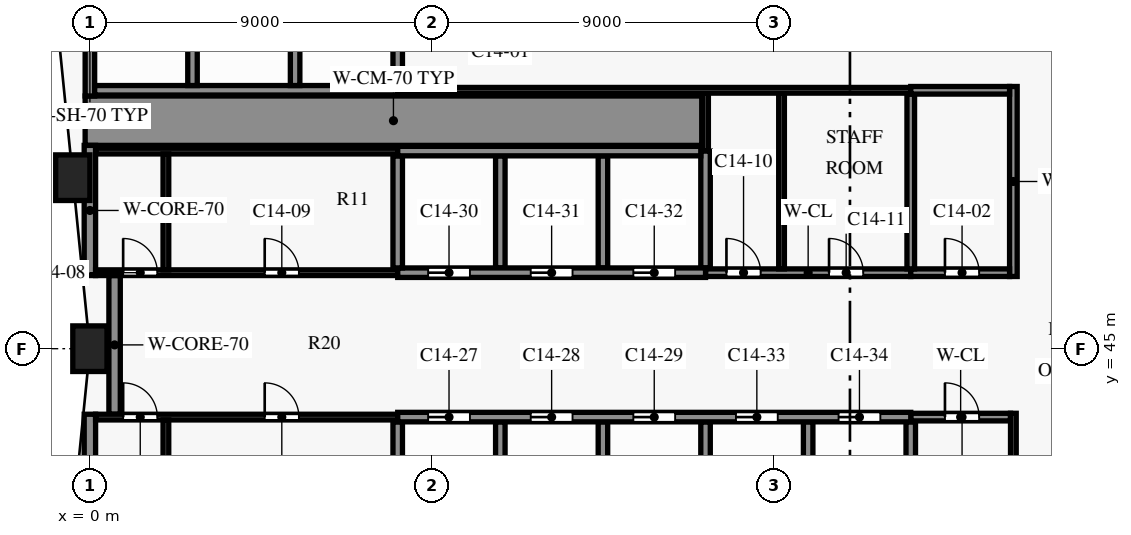
"""IFC4 building model, lengths in metres.
Left out: names, types, materials, properties, quantities, classifications, styles, units other than length and angle.
Written with IfcOpenShell. Run it as: python <this file> out.ifc"""

import sys

from ifc_helpers import new_model, si_unit, direction, frame, frame_2d, origin, origin_2d, place, context, subcontext, project, spatial, rectangle, extrude, element, fill, save


model = new_model("IFC4")
c1 = context("Model", 3, precision=1e-05, world=origin(), true_north=direction((0.0, 1.0)))
c2 = subcontext(c1, "Body", "Model", "MODEL_VIEW")
j1 = project(units=[si_unit("LENGTHUNIT", "METRE"), si_unit("PLANEANGLEUNIT", "RADIAN")], contexts=[c1])
p1 = place(None, origin())
s1 = spatial("IfcSite", under=j1, at=p1, CompositionType="ELEMENT")
p2 = place(p1, origin())
s2 = spatial("IfcBuilding", under=s1, at=p2, CompositionType="ELEMENT")
p3 = place(p2, frame((0.0, 0.0, 96.1)))
s3 = spatial("IfcBuildingStorey", under=s2, at=p3, CompositionType="ELEMENT", Elevation=96.1)
for number, where, z_axis, x_axis in (
    (1, (-0.45, 49.5, 0.0), (0.0, 0.0, 1.0), (0.1, -0.995, 0.0)),
    (2, (0.0, 45.0, 0.0), (0.0, 0.0, 1.0), (0.0, -1.0, 0.0)),
):
    element("IfcColumn", number, at=place(p3, frame(where, z_axis=z_axis, x_axis=x_axis)), inside=s3, PredefinedType="COLUMN", context=c2, shape_type="SweptSolid", body=[
        extrude(rectangle(XDim=0.9, YDim=1.2, at=origin_2d()), origin(), (0.0, 0.0, 1.0), 3.8),
    ])
p4 = place(p3, frame((21.6, 43.2, 0.0), z_axis=(0.0, 0.0, 1.0), x_axis=(1.0, 0.0, 0.0)))
e3 = element("IfcWall", 3, at=p4, inside=s3, PredefinedType="PARTITIONING", context=c2, shape_type="SweptSolid", body=[
    extrude(rectangle(XDim=2.625, YDim=0.2, at=frame_2d((1.312, 0.0))), origin(), (0.0, 0.0, 1.0), 3.5),
])
p5 = place(p4, frame((0.9, 0.0, 0.0)))
e4 = element("IfcOpeningElement", 4, at=p5, cuts=e3, PredefinedType="OPENING", context=c2, shape_type="SweptSolid", body=[
    extrude(rectangle(XDim=0.9, YDim=2.1, at=frame_2d((0.45, 1.05))), frame((0.0, 0.11, 0.0), z_axis=(0.0, -1.0, 0.0), x_axis=(1.0, 0.0, 0.0)), (0.0, 0.0, 1.0), 0.22),
])
p6 = place(p3, frame((0.15, 43.2, 0.0), z_axis=(0.0, 0.0, 1.0), x_axis=(1.0, 0.0, 0.0)))
e5 = element("IfcWall", 5, at=p6, inside=s3, PredefinedType="PARTITIONING", context=c2, shape_type="SweptSolid", body=[
    extrude(rectangle(XDim=7.95, YDim=0.15, at=frame_2d((3.975, 0.0))), origin(), (0.0, 0.0, 1.0), 3.5),
])
p7 = place(p6, frame((0.725, 0.0, 0.0)))
e6 = element("IfcOpeningElement", 6, at=p7, cuts=e5, PredefinedType="OPENING", context=c2, shape_type="SweptSolid", body=[
    extrude(rectangle(XDim=0.9, YDim=2.1, at=frame_2d((0.45, 1.05))), frame((0.0, 0.085, 0.0), z_axis=(0.0, -1.0, 0.0), x_axis=(1.0, 0.0, 0.0)), (0.0, 0.0, 1.0), 0.17),
])
p8 = place(p6, frame((4.45, 0.0, 0.0)))
e7 = element("IfcOpeningElement", 7, at=p8, cuts=e5, PredefinedType="OPENING", context=c2, shape_type="SweptSolid", body=[
    extrude(rectangle(XDim=0.9, YDim=2.1, at=frame_2d((0.45, 1.05))), frame((0.0, 0.085, 0.0), z_axis=(0.0, -1.0, 0.0), x_axis=(1.0, 0.0, 0.0)), (0.0, 0.0, 1.0), 0.17),
])
p9 = place(p3, frame((8.1, 43.2, 0.0), z_axis=(0.0, 0.0, 1.0), x_axis=(1.0, 0.0, 0.0)))
e8 = element("IfcWall", 8, at=p9, inside=s3, PredefinedType="SHEAR", context=c2, shape_type="SweptSolid", body=[
    extrude(rectangle(XDim=13.5, YDim=0.25, at=frame_2d((6.75, 0.0))), origin(), (0.0, 0.0, 1.0), 3.5),
])
p10 = place(p9, frame((0.8, 0.0, 0.0)))
e9 = element("IfcOpeningElement", 9, at=p10, cuts=e8, PredefinedType="OPENING", context=c2, shape_type="SweptSolid", body=[
    extrude(rectangle(XDim=1.1, YDim=2.1, at=frame_2d((0.55, 1.05))), frame((0.0, 0.135, 0.0), z_axis=(0.0, -1.0, 0.0), x_axis=(1.0, 0.0, 0.0)), (0.0, 0.0, 1.0), 0.27),
])
p11 = place(p9, frame((3.5, 0.0, 0.0)))
e10 = element("IfcOpeningElement", 10, at=p11, cuts=e8, PredefinedType="OPENING", context=c2, shape_type="SweptSolid", body=[
    extrude(rectangle(XDim=1.1, YDim=2.1, at=frame_2d((0.55, 1.05))), frame((0.0, 0.135, 0.0), z_axis=(0.0, -1.0, 0.0), x_axis=(1.0, 0.0, 0.0)), (0.0, 0.0, 1.0), 0.27),
])
p12 = place(p9, frame((6.2, 0.0, 0.0)))
e11 = element("IfcOpeningElement", 11, at=p12, cuts=e8, PredefinedType="OPENING", context=c2, shape_type="SweptSolid", body=[
    extrude(rectangle(XDim=1.1, YDim=2.1, at=frame_2d((0.55, 1.05))), frame((0.0, 0.135, 0.0), z_axis=(0.0, -1.0, 0.0), x_axis=(1.0, 0.0, 0.0)), (0.0, 0.0, 1.0), 0.27),
])
p13 = place(p9, frame((8.9, 0.0, 0.0)))
e12 = element("IfcOpeningElement", 12, at=p13, cuts=e8, PredefinedType="OPENING", context=c2, shape_type="SweptSolid", body=[
    extrude(rectangle(XDim=1.1, YDim=2.1, at=frame_2d((0.55, 1.05))), frame((0.0, 0.135, 0.0), z_axis=(0.0, -1.0, 0.0), x_axis=(1.0, 0.0, 0.0)), (0.0, 0.0, 1.0), 0.27),
])
p14 = place(p9, frame((11.6, 0.0, 0.0)))
e13 = element("IfcOpeningElement", 13, at=p14, cuts=e8, PredefinedType="OPENING", context=c2, shape_type="SweptSolid", body=[
    extrude(rectangle(XDim=1.1, YDim=2.1, at=frame_2d((0.55, 1.05))), frame((0.0, 0.135, 0.0), z_axis=(0.0, -1.0, 0.0), x_axis=(1.0, 0.0, 0.0)), (0.0, 0.0, 1.0), 0.27),
])
p15 = place(p3, frame((16.2, 47.0, 0.0), z_axis=(0.0, 0.0, 1.0), x_axis=(1.0, 0.0, 0.0)))
e14 = element("IfcWall", 14, at=p15, inside=s3, PredefinedType="PARTITIONING", context=c2, shape_type="SweptSolid", body=[
    extrude(rectangle(XDim=5.4, YDim=0.2, at=frame_2d((2.7, 0.0))), origin(), (0.0, 0.0, 1.0), 3.5),
])
p16 = place(p15, frame((0.55, 0.0, 0.0)))
e15 = element("IfcOpeningElement", 15, at=p16, cuts=e14, PredefinedType="OPENING", context=c2, shape_type="SweptSolid", body=[
    extrude(rectangle(XDim=0.9, YDim=2.1, at=frame_2d((0.45, 1.05))), frame((0.0, 0.11, 0.0), z_axis=(0.0, -1.0, 0.0), x_axis=(1.0, 0.0, 0.0)), (0.0, 0.0, 1.0), 0.22),
])
p17 = place(p15, frame((3.25, 0.0, 0.0)))
e16 = element("IfcOpeningElement", 16, at=p17, cuts=e14, PredefinedType="OPENING", context=c2, shape_type="SweptSolid", body=[
    extrude(rectangle(XDim=0.9, YDim=2.1, at=frame_2d((0.45, 1.05))), frame((0.0, 0.11, 0.0), z_axis=(0.0, -1.0, 0.0), x_axis=(1.0, 0.0, 0.0)), (0.0, 0.0, 1.0), 0.22),
])
p18 = place(p3, frame((0.15, 47.0, 0.0), z_axis=(0.0, 0.0, 1.0), x_axis=(1.0, 0.0, 0.0)))
e17 = element("IfcWall", 17, at=p18, inside=s3, PredefinedType="PARTITIONING", context=c2, shape_type="SweptSolid", body=[
    extrude(rectangle(XDim=7.95, YDim=0.15, at=frame_2d((3.975, 0.0))), origin(), (0.0, 0.0, 1.0), 3.5),
])
p19 = place(p18, frame((0.725, 0.0, 0.0)))
e18 = element("IfcOpeningElement", 18, at=p19, cuts=e17, PredefinedType="OPENING", context=c2, shape_type="SweptSolid", body=[
    extrude(rectangle(XDim=0.9, YDim=2.1, at=frame_2d((0.45, 1.05))), frame((0.0, 0.085, 0.0), z_axis=(0.0, -1.0, 0.0), x_axis=(1.0, 0.0, 0.0)), (0.0, 0.0, 1.0), 0.17),
])
p20 = place(p18, frame((4.45, 0.0, 0.0)))
e19 = element("IfcOpeningElement", 19, at=p20, cuts=e17, PredefinedType="OPENING", context=c2, shape_type="SweptSolid", body=[
    extrude(rectangle(XDim=0.9, YDim=2.1, at=frame_2d((0.45, 1.05))), frame((0.0, 0.085, 0.0), z_axis=(0.0, -1.0, 0.0), x_axis=(1.0, 0.0, 0.0)), (0.0, 0.0, 1.0), 0.17),
])
p21 = place(p3, frame((21.6, 47.0, 0.0), z_axis=(0.0, 0.0, 1.0), x_axis=(1.0, 0.0, 0.0)))
e20 = element("IfcWall", 20, at=p21, inside=s3, PredefinedType="PARTITIONING", context=c2, shape_type="SweptSolid", body=[
    extrude(rectangle(XDim=2.6, YDim=0.2, at=frame_2d((1.3, 0.0))), origin(), (0.0, 0.0, 1.0), 3.5),
])
p22 = place(p21, frame((0.9, 0.0, 0.0)))
e21 = element("IfcOpeningElement", 21, at=p22, cuts=e20, PredefinedType="OPENING", context=c2, shape_type="SweptSolid", body=[
    extrude(rectangle(XDim=0.9, YDim=2.1, at=frame_2d((0.45, 1.05))), frame((0.0, 0.11, 0.0), z_axis=(0.0, -1.0, 0.0), x_axis=(1.0, 0.0, 0.0)), (0.0, 0.0, 1.0), 0.22),
])
p23 = place(p3, frame((8.1, 47.0, 0.0), z_axis=(0.0, 0.0, 1.0), x_axis=(1.0, 0.0, 0.0)))
e22 = element("IfcWall", 22, at=p23, inside=s3, PredefinedType="SHEAR", context=c2, shape_type="SweptSolid", body=[
    extrude(rectangle(XDim=8.1, YDim=0.25, at=frame_2d((4.05, 0.0))), origin(), (0.0, 0.0, 1.0), 3.5),
])
p24 = place(p23, frame((0.8, 0.0, 0.0)))
e23 = element("IfcOpeningElement", 23, at=p24, cuts=e22, PredefinedType="OPENING", context=c2, shape_type="SweptSolid", body=[
    extrude(rectangle(XDim=1.1, YDim=2.1, at=frame_2d((0.55, 1.05))), frame((0.0, 0.135, 0.0), z_axis=(0.0, -1.0, 0.0), x_axis=(1.0, 0.0, 0.0)), (0.0, 0.0, 1.0), 0.27),
])
p25 = place(p23, frame((3.5, 0.0, 0.0)))
e24 = element("IfcOpeningElement", 24, at=p25, cuts=e22, PredefinedType="OPENING", context=c2, shape_type="SweptSolid", body=[
    extrude(rectangle(XDim=1.1, YDim=2.1, at=frame_2d((0.55, 1.05))), frame((0.0, 0.135, 0.0), z_axis=(0.0, -1.0, 0.0), x_axis=(1.0, 0.0, 0.0)), (0.0, 0.0, 1.0), 0.27),
])
p26 = place(p23, frame((6.2, 0.0, 0.0)))
e25 = element("IfcOpeningElement", 25, at=p26, cuts=e22, PredefinedType="OPENING", context=c2, shape_type="SweptSolid", body=[
    extrude(rectangle(XDim=1.1, YDim=2.1, at=frame_2d((0.55, 1.05))), frame((0.0, 0.135, 0.0), z_axis=(0.0, -1.0, 0.0), x_axis=(1.0, 0.0, 0.0)), (0.0, 0.0, 1.0), 0.27),
])
p27 = place(p3, frame((0.15, 50.2, 0.0), z_axis=(0.0, 0.0, 1.0), x_axis=(1.0, 0.0, 0.0)))
e26 = element("IfcWall", 26, at=p27, inside=s3, PredefinedType="PARTITIONING", context=c2, shape_type="SweptSolid", body=[
    extrude(rectangle(XDim=7.95, YDim=0.15, at=frame_2d((3.975, 0.0))), origin(), (0.0, 0.0, 1.0), 3.5),
])
p28 = place(p3, frame((8.1, 50.2, 0.0), z_axis=(0.0, 0.0, 1.0), x_axis=(1.0, 0.0, 0.0)))
e27 = element("IfcWall", 27, at=p28, inside=s3, PredefinedType="SHEAR", context=c2, shape_type="SweptSolid", body=[
    extrude(rectangle(XDim=7.975, YDim=0.25, at=frame_2d((3.987, 0.0))), origin(), (0.0, 0.0, 1.0), 3.5),
])
p29 = place(p3, frame((-0.125, 51.0, 0.0), z_axis=(0.0, 0.0, 1.0), x_axis=(1.0, 0.0, 0.0)))
e28 = element("IfcWall", 28, at=p29, inside=s3, PredefinedType="SHEAR", context=c2, shape_type="SweptSolid", body=[
    extrude(rectangle(XDim=16.225, YDim=1.3, at=frame_2d((8.113, 0.0))), origin(), (0.0, 0.0, 1.0), 3.5),
])
p30 = place(p3, frame((8.1, 51.8, 0.0), z_axis=(0.0, 0.0, 1.0), x_axis=(1.0, 0.0, 0.0)))
e29 = element("IfcWall", 29, at=p30, inside=s3, PredefinedType="PARTITIONING", context=c2, shape_type="SweptSolid", body=[
    extrude(rectangle(XDim=13.5, YDim=0.15, at=frame_2d((6.75, 0.0))), origin(), (0.0, 0.0, 1.0), 3.5),
])
p31 = place(p3, frame((21.6, 51.8, 0.0), z_axis=(0.0, 0.0, 1.0), x_axis=(1.0, 0.0, 0.0)))
e30 = element("IfcWall", 30, at=p31, inside=s3, PredefinedType="PARTITIONING", context=c2, shape_type="SweptSolid", body=[
    extrude(rectangle(XDim=2.6, YDim=0.2, at=frame_2d((1.3, 0.0))), origin(), (0.0, 0.0, 1.0), 3.5),
])
p32 = place(p3, frame((0.125, 51.8, 0.0), z_axis=(0.0, 0.0, 1.0), x_axis=(1.0, 0.0, 0.0)))
e31 = element("IfcWall", 31, at=p32, inside=s3, PredefinedType="SHEAR", context=c2, shape_type="SweptSolid", body=[
    extrude(rectangle(XDim=7.975, YDim=0.25, at=frame_2d((3.988, 0.0))), origin(), (0.0, 0.0, 1.0), 3.5),
])
p33 = place(p3, frame((0.0, 35.925, 0.0), z_axis=(0.0, 0.0, 1.0), x_axis=(0.0, 1.0, 0.0)))
e32 = element("IfcWall", 32, at=p33, inside=s3, PredefinedType="SHEAR", context=c2, shape_type="SweptSolid", body=[
    extrude(rectangle(XDim=7.35, YDim=0.3, at=frame_2d((3.675, 0.0))), origin(), (0.0, 0.0, 1.0), 3.5),
])
p34 = place(p3, frame((0.0, 46.925, 0.0), z_axis=(0.0, 0.0, 1.0), x_axis=(0.0, 1.0, 0.0)))
e33 = element("IfcWall", 33, at=p34, inside=s3, PredefinedType="SHEAR", context=c2, shape_type="SweptSolid", body=[
    extrude(rectangle(XDim=3.425, YDim=0.3, at=frame_2d((1.712, 0.0))), origin(), (0.0, 0.0, 1.0), 3.5),
])
p35 = place(p3, frame((0.0, 51.65, 0.0), z_axis=(0.0, 0.0, 1.0), x_axis=(0.0, 1.0, 0.0)))
e34 = element("IfcWall", 34, at=p35, inside=s3, PredefinedType="SHEAR", context=c2, shape_type="SweptSolid", body=[
    extrude(rectangle(XDim=3.35, YDim=0.25, at=frame_2d((1.675, 0.0))), origin(), (0.0, 0.0, 1.0), 3.5),
])
p36 = place(p3, frame((0.65, 43.275, 0.0), z_axis=(0.0, 0.0, 1.0), x_axis=(0.0, 1.0, 0.0)))
e35 = element("IfcWall", 35, at=p36, inside=s3, PredefinedType="SHEAR", context=c2, shape_type="SweptSolid", body=[
    extrude(rectangle(XDim=3.65, YDim=0.3, at=frame_2d((1.825, 0.0))), origin(), (0.0, 0.0, 1.0), 3.5),
])
for number, where, z_axis, x_axis in (
    (36, (2.0, 40.075, 0.0), (0.0, 0.0, 1.0), (0.0, 1.0, 0.0)),
    (37, (2.0, 47.075, 0.0), (0.0, 0.0, 1.0), (0.0, 1.0, 0.0)),
):
    element("IfcWall", number, at=place(p3, frame(where, z_axis=z_axis, x_axis=x_axis)), inside=s3, PredefinedType="PARTITIONING", context=c2, shape_type="SweptSolid", body=[
        extrude(rectangle(XDim=3.05, YDim=0.15, at=frame_2d((1.525, 0.0))), origin(), (0.0, 0.0, 1.0), 3.5),
    ])
for number, where, z_axis, x_axis in (
    (38, (2.7, 51.925, 0.0), (0.0, 0.0, 1.0), (0.0, 1.0, 0.0)),
    (39, (5.4, 51.925, 0.0), (0.0, 0.0, 1.0), (0.0, 1.0, 0.0)),
    (40, (8.1, 40.125, 0.0), (0.0, 0.0, 1.0), (0.0, 1.0, 0.0)),
    (41, (8.1, 47.125, 0.0), (0.0, 0.0, 1.0), (0.0, 1.0, 0.0)),
    (42, (8.1, 51.925, 0.0), (0.0, 0.0, 1.0), (0.0, 1.0, 0.0)),
    (43, (10.8, 40.125, 0.0), (0.0, 0.0, 1.0), (0.0, 1.0, 0.0)),
    (44, (10.8, 47.125, 0.0), (0.0, 0.0, 1.0), (0.0, 1.0, 0.0)),
    (45, (13.5, 40.125, 0.0), (0.0, 0.0, 1.0), (0.0, 1.0, 0.0)),
    (46, (13.5, 47.125, 0.0), (0.0, 0.0, 1.0), (0.0, 1.0, 0.0)),
):
    element("IfcWall", number, at=place(p3, frame(where, z_axis=z_axis, x_axis=x_axis)), inside=s3, PredefinedType="SHEAR", context=c2, shape_type="SweptSolid", body=[
        extrude(rectangle(XDim=2.95, YDim=0.25, at=frame_2d((1.475, 0.0))), origin(), (0.0, 0.0, 1.0), 3.5),
    ])
p37 = place(p3, frame((16.2, 50.2, 0.0), z_axis=(0.0, 0.0, 1.0), x_axis=(0.0, 1.0, 0.0)))
e47 = element("IfcWall", 47, at=p37, inside=s3, PredefinedType="PARTITIONING", context=c2, shape_type="SweptSolid", body=[
    extrude(rectangle(XDim=1.525, YDim=0.15, at=frame_2d((0.763, 0.0))), origin(), (0.0, 0.0, 1.0), 3.5),
])
p38 = place(p3, frame((16.2, 40.125, 0.0), z_axis=(0.0, 0.0, 1.0), x_axis=(0.0, 1.0, 0.0)))
e48 = element("IfcWall", 48, at=p38, inside=s3, PredefinedType="SHEAR", context=c2, shape_type="SweptSolid", body=[
    extrude(rectangle(XDim=2.95, YDim=0.25, at=frame_2d((1.475, 0.0))), origin(), (0.0, 0.0, 1.0), 3.5),
])
p39 = place(p3, frame((16.2, 47.125, 0.0), z_axis=(0.0, 0.0, 1.0), x_axis=(0.0, 1.0, 0.0)))
e49 = element("IfcWall", 49, at=p39, inside=s3, PredefinedType="SHEAR", context=c2, shape_type="SweptSolid", body=[
    extrude(rectangle(XDim=3.075, YDim=0.25, at=frame_2d((1.538, 0.0))), origin(), (0.0, 0.0, 1.0), 3.5),
])
p40 = place(p3, frame((18.2, 47.1, 0.0), z_axis=(0.0, 0.0, 1.0), x_axis=(0.0, 1.0, 0.0)))
e50 = element("IfcWall", 50, at=p40, inside=s3, PredefinedType="PARTITIONING", context=c2, shape_type="SweptSolid", body=[
    extrude(rectangle(XDim=4.625, YDim=0.15, at=frame_2d((2.312, 0.0))), origin(), (0.0, 0.0, 1.0), 3.5),
])
p41 = place(p3, frame((18.9, 40.125, 0.0), z_axis=(0.0, 0.0, 1.0), x_axis=(0.0, 1.0, 0.0)))
e51 = element("IfcWall", 51, at=p41, inside=s3, PredefinedType="SHEAR", context=c2, shape_type="SweptSolid", body=[
    extrude(rectangle(XDim=2.95, YDim=0.25, at=frame_2d((1.475, 0.0))), origin(), (0.0, 0.0, 1.0), 3.5),
])
p42 = place(p3, frame((21.6, 47.1, 0.0), z_axis=(0.0, 0.0, 1.0), x_axis=(0.0, 1.0, 0.0)))
e52 = element("IfcWall", 52, at=p42, inside=s3, PredefinedType="PARTITIONING", context=c2, shape_type="SweptSolid", body=[
    extrude(rectangle(XDim=4.6, YDim=0.2, at=frame_2d((2.3, 0.0))), origin(), (0.0, 0.0, 1.0), 3.5),
])
p43 = place(p3, frame((21.6, 40.125, 0.0), z_axis=(0.0, 0.0, 1.0), x_axis=(0.0, 1.0, 0.0)))
e53 = element("IfcWall", 53, at=p43, inside=s3, PredefinedType="SHEAR", context=c2, shape_type="SweptSolid", body=[
    extrude(rectangle(XDim=2.95, YDim=0.25, at=frame_2d((1.475, 0.0))), origin(), (0.0, 0.0, 1.0), 3.5),
])
p44 = place(p3, frame((24.3, 35.925, 0.0), z_axis=(0.0, 0.0, 1.0), x_axis=(0.0, 1.0, 0.0)))
e54 = element("IfcWall", 54, at=p44, inside=s3, PredefinedType="PARTITIONING", context=c2, shape_type="SweptSolid", body=[
    extrude(rectangle(XDim=7.375, YDim=0.15, at=frame_2d((3.688, 0.0))), origin(), (0.0, 0.0, 1.0), 3.5),
])
p45 = place(p3, frame((24.3, 46.9, 0.0), z_axis=(0.0, 0.0, 1.0), x_axis=(0.0, 1.0, 0.0)))
e55 = element("IfcWall", 55, at=p45, inside=s3, PredefinedType="SHEAR", context=c2, shape_type="SweptSolid", body=[
    extrude(rectangle(XDim=5.0, YDim=0.2, at=frame_2d((2.5, 0.0))), origin(), (0.0, 0.0, 1.0), 3.5),
])
p46 = place(p22, origin())
e56 = element("IfcDoor", 56, at=p46, inside=s3, OperationType="SINGLE_SWING_LEFT", PredefinedType="DOOR", context=c2, shape_type="SweptSolid", body=[
    extrude(rectangle(XDim=0.9, YDim=2.1, at=frame_2d((0.45, 1.05))), frame((0.0, 0.025, 0.0), z_axis=(0.0, -1.0, 0.0), x_axis=(1.0, 0.0, 0.0)), (0.0, 0.0, 1.0), 0.05),
])
fill(e21, e56)
p47 = place(p19, origin())
e57 = element("IfcDoor", 57, at=p47, inside=s3, OperationType="SINGLE_SWING_RIGHT", PredefinedType="DOOR", context=c2, shape_type="SweptSolid", body=[
    extrude(rectangle(XDim=0.9, YDim=2.1, at=frame_2d((0.45, 1.05))), frame((0.0, 0.025, 0.0), z_axis=(0.0, -1.0, 0.0), x_axis=(1.0, 0.0, 0.0)), (0.0, 0.0, 1.0), 0.05),
])
fill(e18, e57)
p48 = place(p20, origin())
e58 = element("IfcDoor", 58, at=p48, inside=s3, OperationType="SINGLE_SWING_LEFT", PredefinedType="DOOR", context=c2, shape_type="SweptSolid", body=[
    extrude(rectangle(XDim=0.9, YDim=2.1, at=frame_2d((0.45, 1.05))), frame((0.0, 0.025, 0.0), z_axis=(0.0, -1.0, 0.0), x_axis=(1.0, 0.0, 0.0)), (0.0, 0.0, 1.0), 0.05),
])
fill(e19, e58)
p49 = place(p16, origin())
e59 = element("IfcDoor", 59, at=p49, inside=s3, OperationType="SINGLE_SWING_LEFT", PredefinedType="DOOR", context=c2, shape_type="SweptSolid", body=[
    extrude(rectangle(XDim=0.9, YDim=2.1, at=frame_2d((0.45, 1.05))), frame((0.0, 0.025, 0.0), z_axis=(0.0, -1.0, 0.0), x_axis=(1.0, 0.0, 0.0)), (0.0, 0.0, 1.0), 0.05),
])
fill(e15, e59)
p50 = place(p17, origin())
e60 = element("IfcDoor", 60, at=p50, inside=s3, OperationType="SINGLE_SWING_RIGHT", PredefinedType="DOOR", context=c2, shape_type="SweptSolid", body=[
    extrude(rectangle(XDim=0.9, YDim=2.1, at=frame_2d((0.45, 1.05))), frame((0.0, 0.025, 0.0), z_axis=(0.0, -1.0, 0.0), x_axis=(1.0, 0.0, 0.0)), (0.0, 0.0, 1.0), 0.05),
])
fill(e16, e60)
p51 = place(p7, origin())
e61 = element("IfcDoor", 61, at=p51, inside=s3, OperationType="SINGLE_SWING_LEFT", PredefinedType="DOOR", context=c2, shape_type="SweptSolid", body=[
    extrude(rectangle(XDim=0.9, YDim=2.1, at=frame_2d((0.45, 1.05))), frame((0.0, 0.025, 0.0), z_axis=(0.0, -1.0, 0.0), x_axis=(1.0, 0.0, 0.0)), (0.0, 0.0, 1.0), 0.05),
])
fill(e6, e61)
p52 = place(p8, origin())
e62 = element("IfcDoor", 62, at=p52, inside=s3, OperationType="SINGLE_SWING_RIGHT", PredefinedType="DOOR", context=c2, shape_type="SweptSolid", body=[
    extrude(rectangle(XDim=0.9, YDim=2.1, at=frame_2d((0.45, 1.05))), frame((0.0, 0.025, 0.0), z_axis=(0.0, -1.0, 0.0), x_axis=(1.0, 0.0, 0.0)), (0.0, 0.0, 1.0), 0.05),
])
fill(e7, e62)
p53 = place(p5, origin())
e63 = element("IfcDoor", 63, at=p53, inside=s3, OperationType="SINGLE_SWING_RIGHT", PredefinedType="DOOR", context=c2, shape_type="SweptSolid", body=[
    extrude(rectangle(XDim=0.9, YDim=2.1, at=frame_2d((0.45, 1.05))), frame((0.0, 0.025, 0.0), z_axis=(0.0, -1.0, 0.0), x_axis=(1.0, 0.0, 0.0)), (0.0, 0.0, 1.0), 0.05),
])
fill(e4, e63)
p54 = place(p10, origin())
e64 = element("IfcDoor", 64, at=p54, inside=s3, OperationType="DOUBLE_DOOR_SLIDING", PredefinedType="DOOR", context=c2, shape_type="SweptSolid", body=[
    extrude(rectangle(XDim=1.1, YDim=2.1, at=frame_2d((0.55, 1.05))), frame((0.0, 0.025, 0.0), z_axis=(0.0, -1.0, 0.0), x_axis=(1.0, 0.0, 0.0)), (0.0, 0.0, 1.0), 0.05),
])
fill(e9, e64)
p55 = place(p11, origin())
e65 = element("IfcDoor", 65, at=p55, inside=s3, OperationType="DOUBLE_DOOR_SLIDING", PredefinedType="DOOR", context=c2, shape_type="SweptSolid", body=[
    extrude(rectangle(XDim=1.1, YDim=2.1, at=frame_2d((0.55, 1.05))), frame((0.0, 0.025, 0.0), z_axis=(0.0, -1.0, 0.0), x_axis=(1.0, 0.0, 0.0)), (0.0, 0.0, 1.0), 0.05),
])
fill(e10, e65)
p56 = place(p12, origin())
e66 = element("IfcDoor", 66, at=p56, inside=s3, OperationType="DOUBLE_DOOR_SLIDING", PredefinedType="DOOR", context=c2, shape_type="SweptSolid", body=[
    extrude(rectangle(XDim=1.1, YDim=2.1, at=frame_2d((0.55, 1.05))), frame((0.0, 0.025, 0.0), z_axis=(0.0, -1.0, 0.0), x_axis=(1.0, 0.0, 0.0)), (0.0, 0.0, 1.0), 0.05),
])
fill(e11, e66)
p57 = place(p24, origin())
e67 = element("IfcDoor", 67, at=p57, inside=s3, OperationType="DOUBLE_DOOR_SLIDING", PredefinedType="DOOR", context=c2, shape_type="SweptSolid", body=[
    extrude(rectangle(XDim=1.1, YDim=2.1, at=frame_2d((0.55, 1.05))), frame((0.0, 0.025, 0.0), z_axis=(0.0, -1.0, 0.0), x_axis=(1.0, 0.0, 0.0)), (0.0, 0.0, 1.0), 0.05),
])
fill(e23, e67)
p58 = place(p25, origin())
e68 = element("IfcDoor", 68, at=p58, inside=s3, OperationType="DOUBLE_DOOR_SLIDING", PredefinedType="DOOR", context=c2, shape_type="SweptSolid", body=[
    extrude(rectangle(XDim=1.1, YDim=2.1, at=frame_2d((0.55, 1.05))), frame((0.0, 0.025, 0.0), z_axis=(0.0, -1.0, 0.0), x_axis=(1.0, 0.0, 0.0)), (0.0, 0.0, 1.0), 0.05),
])
fill(e24, e68)
p59 = place(p26, origin())
e69 = element("IfcDoor", 69, at=p59, inside=s3, OperationType="DOUBLE_DOOR_SLIDING", PredefinedType="DOOR", context=c2, shape_type="SweptSolid", body=[
    extrude(rectangle(XDim=1.1, YDim=2.1, at=frame_2d((0.55, 1.05))), frame((0.0, 0.025, 0.0), z_axis=(0.0, -1.0, 0.0), x_axis=(1.0, 0.0, 0.0)), (0.0, 0.0, 1.0), 0.05),
])
fill(e25, e69)
p60 = place(p13, origin())
e70 = element("IfcDoor", 70, at=p60, inside=s3, OperationType="DOUBLE_DOOR_SLIDING", PredefinedType="DOOR", context=c2, shape_type="SweptSolid", body=[
    extrude(rectangle(XDim=1.1, YDim=2.1, at=frame_2d((0.55, 1.05))), frame((0.0, 0.025, 0.0), z_axis=(0.0, -1.0, 0.0), x_axis=(1.0, 0.0, 0.0)), (0.0, 0.0, 1.0), 0.05),
])
fill(e12, e70)
p61 = place(p14, origin())
e71 = element("IfcDoor", 71, at=p61, inside=s3, OperationType="DOUBLE_DOOR_SLIDING", PredefinedType="DOOR", context=c2, shape_type="SweptSolid", body=[
    extrude(rectangle(XDim=1.1, YDim=2.1, at=frame_2d((0.55, 1.05))), frame((0.0, 0.025, 0.0), z_axis=(0.0, -1.0, 0.0), x_axis=(1.0, 0.0, 0.0)), (0.0, 0.0, 1.0), 0.05),
])
fill(e13, e71)
save(model, sys.argv[1])
